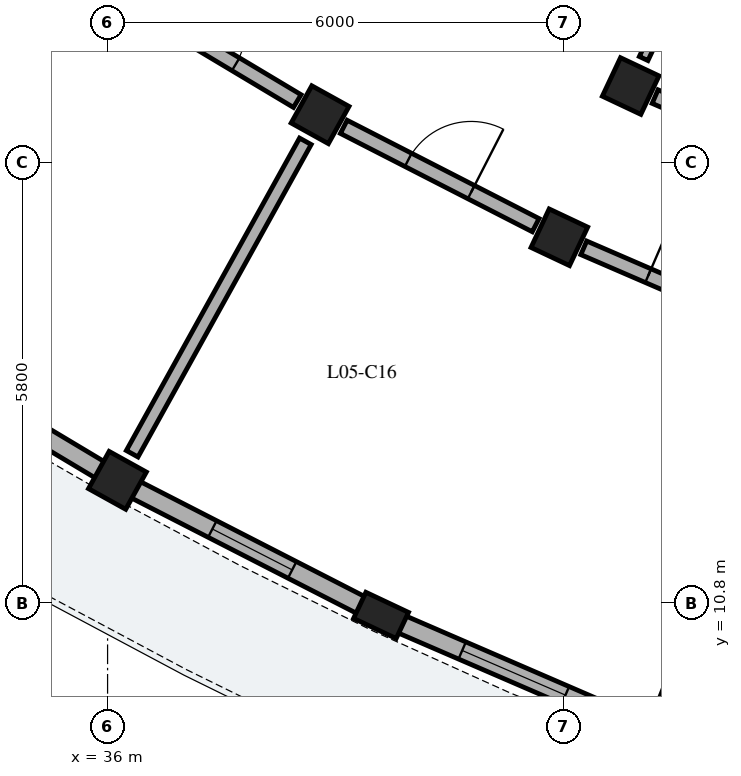
"""IFC4 building model, lengths in metres.
Left out: names, types, materials, properties, quantities, classifications, styles, units other than length and angle.
Written with IfcOpenShell. Run it as: python <this file> out.ifc"""

import sys

from ifc_helpers import new_model, si_unit, direction, frame, frame_2d, origin, origin_2d, place, context, subcontext, project, spatial, rectangle, extrude, element, fill, save


model = new_model("IFC4")
c1 = context("Model", 3, precision=1e-05, world=origin(), true_north=direction((0.0, 1.0)))
c2 = subcontext(c1, "Body", "Model", "MODEL_VIEW")
j1 = project(units=[si_unit("LENGTHUNIT", "METRE"), si_unit("PLANEANGLEUNIT", "RADIAN")], contexts=[c1])
p1 = place(None, origin())
s1 = spatial("IfcSite", under=j1, at=p1, CompositionType="ELEMENT")
p2 = place(p1, origin())
s2 = spatial("IfcBuilding", under=s1, at=p2, CompositionType="ELEMENT")
p3 = place(p2, frame((0.0, 0.0, 18.92)))
s3 = spatial("IfcBuildingStorey", under=s2, at=p3, CompositionType="ELEMENT", Elevation=18.92)
for number, where, z_axis, x_axis in (
    (1, (38.796, 17.227, 0.0), (0.0, 0.0, 1.0), (-0.485, -0.875, 0.0)),
    (2, (36.13, 12.417, 0.0), (0.0, 0.0, 1.0), (-0.485, -0.875, 0.0)),
    (3, (42.882, 17.604, 0.0), (0.0, 0.0, 1.0), (-0.427, -0.904, 0.0)),
    (4, (41.944, 15.614, 0.0), (0.0, 0.0, 1.0), (-0.427, -0.904, 0.0)),
):
    element("IfcColumn", number, at=place(p3, frame(where, z_axis=z_axis, x_axis=x_axis)), inside=s3, PredefinedType="COLUMN", context=c2, shape_type="SweptSolid", body=[
        extrude(rectangle(XDim=0.56, YDim=0.56, at=origin_2d()), origin(), (0.0, 0.0, 1.0), 3.11),
    ])
p4 = place(p3, frame((39.598, 10.64, 0.0), z_axis=(0.0, 0.0, 1.0), x_axis=(-0.426568739901, -0.904455145454, 0.0)))
e5 = element("IfcColumn", 5, at=p4, inside=s3, PredefinedType="PILASTER", context=c2, shape_type="SweptSolid", body=[
    extrude(rectangle(XDim=0.38, YDim=0.62, at=origin_2d()), origin(), (0.0, 0.0, 1.0), 3.11),
])
p5 = place(p3, frame((32.922, 14.334, 0.0), z_axis=(0.0, 0.0, 1.0), x_axis=(0.858288874148, -0.513166842766, 0.0)))
e6 = element("IfcWall", 6, at=p5, inside=s3, PredefinedType="SOLIDWALL", context=c2, shape_type="SweptSolid", body=[
    extrude(rectangle(XDim=3.487, YDim=0.245, at=frame_2d((1.743, 0.0))), origin(), (0.0, 0.0, 1.0), 2.355),
])
p6 = place(p5, frame((0.868, 0.0, 0.35)))
e7 = element("IfcOpeningElement", 7, at=p6, cuts=e6, PredefinedType="OPENING", context=c2, shape_type="SweptSolid", body=[
    extrude(rectangle(XDim=1.75, YDim=1.85, at=frame_2d((0.875, 0.925))), frame((0.0, 0.133, 0.0), z_axis=(0.0, -1.0, 0.0), x_axis=(1.0, 0.0, 0.0)), (0.0, 0.0, 1.0), 0.265),
])
p7 = place(p3, frame((36.352, 12.302, 0.0), z_axis=(0.0, 0.0, 1.0), x_axis=(0.890001092753, -0.45595839163, 0.0)))
e8 = element("IfcWall", 8, at=p7, inside=s3, PredefinedType="SOLIDWALL", context=c2, shape_type="SweptSolid", body=[
    extrude(rectangle(XDim=3.487, YDim=0.245, at=frame_2d((1.743, 0.0))), origin(), (0.0, 0.0, 1.0), 2.355),
])
p8 = place(p7, frame((1.153, 0.0, 0.55)))
e9 = element("IfcOpeningElement", 9, at=p8, cuts=e8, PredefinedType="OPENING", context=c2, shape_type="SweptSolid", body=[
    extrude(rectangle(XDim=1.18, YDim=1.48, at=frame_2d((0.59, 0.74))), frame((0.0, 0.133, 0.0), z_axis=(0.0, -1.0, 0.0), x_axis=(1.0, 0.0, 0.0)), (0.0, 0.0, 1.0), 0.265),
])
p9 = place(p3, frame((39.745, 10.576, 0.0), z_axis=(0.0, 0.0, 1.0), x_axis=(0.917938367037, -0.396723019652, 0.0)))
e10 = element("IfcWall", 10, at=p9, inside=s3, PredefinedType="SOLIDWALL", context=c2, shape_type="SweptSolid", body=[
    extrude(rectangle(XDim=3.487, YDim=0.245, at=frame_2d((1.743, 0.0))), origin(), (0.0, 0.0, 1.0), 2.355),
])
p10 = place(p9, frame((1.003, 0.0, 0.55)))
e11 = element("IfcOpeningElement", 11, at=p10, cuts=e10, PredefinedType="OPENING", context=c2, shape_type="SweptSolid", body=[
    extrude(rectangle(XDim=1.48, YDim=1.62, at=frame_2d((0.74, 0.81))), frame((0.0, 0.133, 0.0), z_axis=(0.0, -1.0, 0.0), x_axis=(1.0, 0.0, 0.0)), (0.0, 0.0, 1.0), 0.265),
])
p11 = place(p3, frame((35.544, 18.705, 0.0), z_axis=(0.0, 0.0, 1.0), x_axis=(-0.540959731567, -0.84104849374, 0.0)))
e12 = element("IfcWall", 12, at=p11, inside=s3, PredefinedType="PARTITIONING", context=c2, shape_type="SweptSolid", body=[
    extrude(rectangle(XDim=4.7, YDim=0.115, at=frame_2d((2.35, 0.0))), origin(), (0.0, 0.0, 1.0), 2.37),
])
p12 = place(p11, frame((1.895, 0.0, 0.0)))
e13 = element("IfcOpeningElement", 13, at=p12, cuts=e12, PredefinedType="OPENING", context=c2, shape_type="SweptSolid", body=[
    extrude(rectangle(XDim=0.91, YDim=2.1, at=frame_2d((0.455, 1.05))), frame((0.0, 0.067, 0.0), z_axis=(0.0, -1.0, 0.0), x_axis=(1.0, 0.0, 0.0)), (0.0, 0.0, 1.0), 0.135),
])
p13 = place(p3, frame((36.061, 18.862, 0.0), z_axis=(0.0, 0.0, 1.0), x_axis=(0.858281647443, -0.51317892948, 0.0)))
e14 = element("IfcWall", 14, at=p13, inside=s3, PredefinedType="PARTITIONING", context=c2, shape_type="SweptSolid", body=[
    extrude(rectangle(XDim=2.837, YDim=0.195, at=frame_2d((1.418, 0.0))), origin(), (0.0, 0.0, 1.0), 2.37),
])
p14 = place(p13, frame((0.944, 0.0, 0.0)))
e15 = element("IfcOpeningElement", 15, at=p14, cuts=e14, PredefinedType="OPENING", context=c2, shape_type="SweptSolid", body=[
    extrude(rectangle(XDim=0.95, YDim=2.13, at=frame_2d((0.475, 1.065))), frame((0.0, 0.107, 0.0), z_axis=(0.0, -1.0, 0.0), x_axis=(1.0, 0.0, 0.0)), (0.0, 0.0, 1.0), 0.215),
])
p15 = place(p3, frame((38.602, 16.877, 0.0), z_axis=(0.0, 0.0, 1.0), x_axis=(-0.484813534336, -0.874617537513, 0.0)))
e16 = element("IfcWall", 16, at=p15, inside=s3, PredefinedType="PARTITIONING", context=c2, shape_type="SweptSolid", body=[
    extrude(rectangle(XDim=4.7, YDim=0.175, at=frame_2d((2.35, 0.0))), origin(), (0.0, 0.0, 1.0), 2.37),
])
p16 = place(p3, frame((39.107, 17.067, 0.0), z_axis=(0.0, 0.0, 1.0), x_axis=(0.890030590607, -0.45590080915, 0.0)))
e17 = element("IfcWall", 17, at=p16, inside=s3, PredefinedType="PARTITIONING", context=c2, shape_type="SweptSolid", body=[
    extrude(rectangle(XDim=2.837, YDim=0.195, at=frame_2d((1.418, 0.0))), origin(), (0.0, 0.0, 1.0), 2.37),
])
p17 = place(p16, frame((0.954, 0.0, 0.0)))
e18 = element("IfcOpeningElement", 18, at=p17, cuts=e17, PredefinedType="OPENING", context=c2, shape_type="SweptSolid", body=[
    extrude(rectangle(XDim=0.93, YDim=2.12, at=frame_2d((0.465, 1.06))), frame((0.0, 0.107, 0.0), z_axis=(0.0, -1.0, 0.0), x_axis=(1.0, 0.0, 0.0)), (0.0, 0.0, 1.0), 0.215),
])
p18 = place(p3, frame((45.868, 23.935, 0.0), z_axis=(0.0, 0.0, 1.0), x_axis=(-0.426573573579, -0.904452865728, 0.0)))
e19 = element("IfcWall", 19, at=p18, inside=s3, PredefinedType="PARTITIONING", context=c2, shape_type="SweptSolid", body=[
    extrude(rectangle(XDim=6.6, YDim=0.125, at=frame_2d((3.3, 0.0))), origin(), (0.0, 0.0, 1.0), 2.37),
])
p19 = place(p18, frame((2.845, 0.0, 0.0)))
e20 = element("IfcOpeningElement", 20, at=p19, cuts=e19, PredefinedType="OPENING", context=c2, shape_type="SweptSolid", body=[
    extrude(rectangle(XDim=0.91, YDim=2.1, at=frame_2d((0.455, 1.05))), frame((0.0, 0.073, 0.0), z_axis=(0.0, -1.0, 0.0), x_axis=(1.0, 0.0, 0.0)), (0.0, 0.0, 1.0), 0.145),
])
p20 = place(p3, frame((42.265, 15.475, 0.0), z_axis=(0.0, 0.0, 1.0), x_axis=(0.917943439406, -0.396711282991, 0.0)))
e21 = element("IfcWall", 21, at=p20, inside=s3, PredefinedType="PARTITIONING", context=c2, shape_type="SweptSolid", body=[
    extrude(rectangle(XDim=2.837, YDim=0.195, at=frame_2d((1.418, 0.0))), origin(), (0.0, 0.0, 1.0), 2.37),
])
p21 = place(p20, frame((0.924, 0.0, 0.0)))
e22 = element("IfcOpeningElement", 22, at=p21, cuts=e21, PredefinedType="OPENING", context=c2, shape_type="SweptSolid", body=[
    extrude(rectangle(XDim=0.99, YDim=2.16, at=frame_2d((0.495, 1.08))), frame((0.0, 0.107, 0.0), z_axis=(0.0, -1.0, 0.0), x_axis=(1.0, 0.0, 0.0)), (0.0, 0.0, 1.0), 0.215),
])
p22 = place(p3, frame((43.204, 17.465, 0.0), z_axis=(0.0, 0.0, 1.0), x_axis=(0.91793557165, -0.39672948756, 0.0)))
e23 = element("IfcWall", 23, at=p22, inside=s3, PredefinedType="PARTITIONING", context=c2, shape_type="SweptSolid", body=[
    extrude(rectangle(XDim=2.693, YDim=0.195, at=frame_2d((1.346, 0.0))), origin(), (0.0, 0.0, 1.0), 2.37),
])
p23 = place(p22, frame((0.852, 0.0, 0.0)))
e24 = element("IfcOpeningElement", 24, at=p23, cuts=e23, PredefinedType="OPENING", context=c2, shape_type="SweptSolid", body=[
    extrude(rectangle(XDim=0.99, YDim=2.16, at=frame_2d((0.495, 1.08))), frame((0.0, 0.107, 0.0), z_axis=(0.0, -1.0, 0.0), x_axis=(1.0, 0.0, 0.0)), (0.0, 0.0, 1.0), 0.215),
])
p24 = place(p3, frame((45.044, 13.839, 0.0), z_axis=(0.0, 0.0, 1.0), x_axis=(-0.366468650514, -0.930430399434, 0.0)))
e25 = element("IfcWall", 25, at=p24, inside=s3, PredefinedType="PARTITIONING", context=c2, shape_type="SweptSolid", body=[
    extrude(rectangle(XDim=4.7, YDim=0.175, at=frame_2d((2.35, 0.0))), origin(), (0.0, 0.0, 1.0), 2.37),
])
p25 = place(p8, origin())
e26 = element("IfcWindow", 26, at=p25, inside=s3, PartitioningType="SINGLE_PANEL", PredefinedType="WINDOW", context=c2, shape_type="SweptSolid", body=[
    extrude(rectangle(XDim=1.18, YDim=1.48, at=frame_2d((0.59, 0.74))), frame((0.0, 0.03, 0.0), z_axis=(0.0, -1.0, 0.0), x_axis=(1.0, 0.0, 0.0)), (0.0, 0.0, 1.0), 0.06),
])
fill(e9, e26)
p26 = place(p10, origin())
e27 = element("IfcWindow", 27, at=p26, inside=s3, PartitioningType="SINGLE_PANEL", PredefinedType="WINDOW", context=c2, shape_type="SweptSolid", body=[
    extrude(rectangle(XDim=1.48, YDim=1.62, at=frame_2d((0.74, 0.81))), frame((0.0, 0.03, 0.0), z_axis=(0.0, -1.0, 0.0), x_axis=(1.0, 0.0, 0.0)), (0.0, 0.0, 1.0), 0.06),
])
fill(e11, e27)
p27 = place(p14, origin())
e28 = element("IfcDoor", 28, at=p27, inside=s3, OperationType="SINGLE_SWING_LEFT", PredefinedType="DOOR", context=c2, shape_type="SweptSolid", body=[
    extrude(rectangle(XDim=0.95, YDim=2.13, at=frame_2d((0.475, 1.065))), frame((0.0, 0.025, 0.0), z_axis=(0.0, -1.0, 0.0), x_axis=(1.0, 0.0, 0.0)), (0.0, 0.0, 1.0), 0.05),
])
fill(e15, e28)
p28 = place(p17, origin())
e29 = element("IfcDoor", 29, at=p28, inside=s3, OperationType="SINGLE_SWING_RIGHT", PredefinedType="DOOR", context=c2, shape_type="SweptSolid", body=[
    extrude(rectangle(XDim=0.93, YDim=2.12, at=frame_2d((0.465, 1.06))), frame((0.0, 0.025, 0.0), z_axis=(0.0, -1.0, 0.0), x_axis=(1.0, 0.0, 0.0)), (0.0, 0.0, 1.0), 0.05),
])
fill(e18, e29)
p29 = place(p21, origin())
e30 = element("IfcDoor", 30, at=p29, inside=s3, OperationType="SINGLE_SWING_LEFT", PredefinedType="DOOR", context=c2, shape_type="SweptSolid", body=[
    extrude(rectangle(XDim=0.99, YDim=2.16, at=frame_2d((0.495, 1.08))), frame((0.0, 0.025, 0.0), z_axis=(0.0, -1.0, 0.0), x_axis=(1.0, 0.0, 0.0)), (0.0, 0.0, 1.0), 0.05),
])
fill(e22, e30)
save(model, sys.argv[1])
